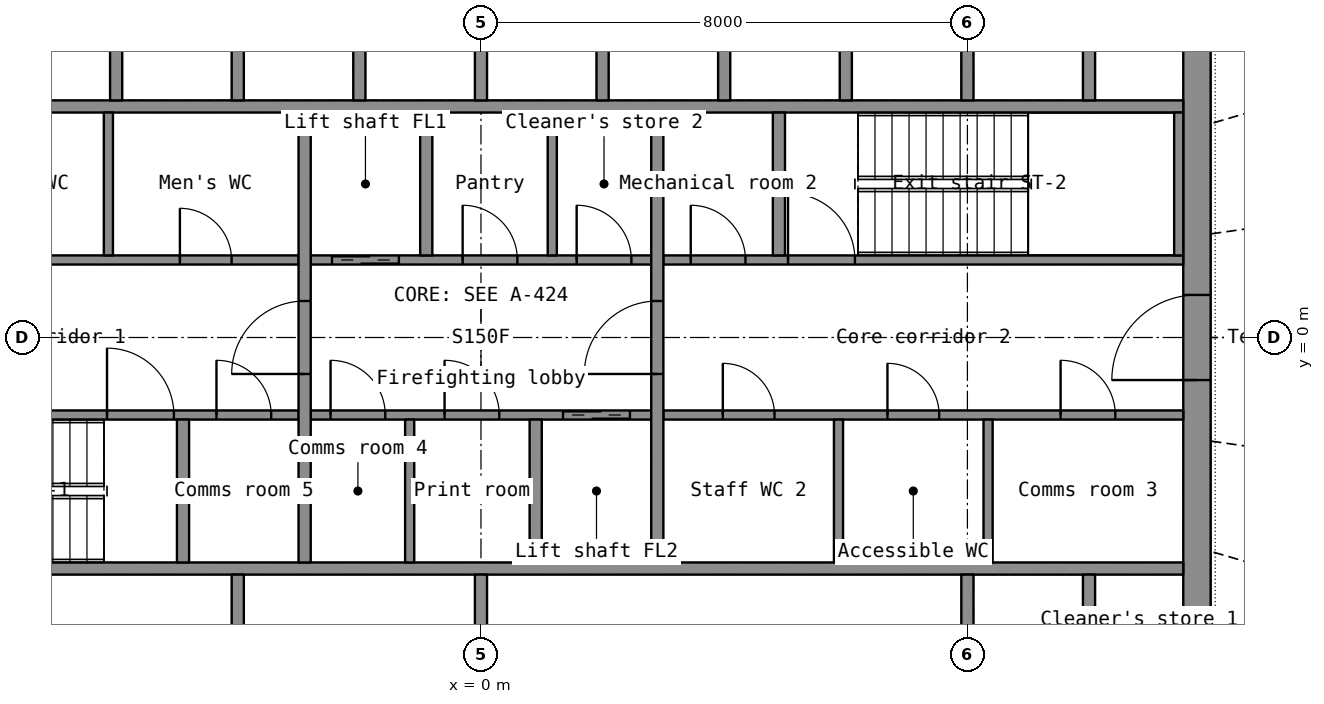
"""IFC4 building model, lengths in metres.
Left out: names, types, materials, properties, quantities, classifications, styles, units other than length and angle.
Written with IfcOpenShell. Run it as: python <this file> out.ifc"""

import sys

from ifc_helpers import new_model, si_unit, direction, frame, frame_2d, origin, place, context, subcontext, project, spatial, rectangle, extrude, element, fill, save


model = new_model("IFC4")
c1 = context("Model", 3, precision=1e-05, world=origin(), true_north=direction((0.0, 1.0)))
c2 = subcontext(c1, "Body", "Model", "MODEL_VIEW")
j1 = project(units=[si_unit("LENGTHUNIT", "METRE"), si_unit("PLANEANGLEUNIT", "RADIAN")], contexts=[c1])
p1 = place(None, origin())
s1 = spatial("IfcSite", under=j1, at=p1, CompositionType="ELEMENT")
p2 = place(p1, origin())
s2 = spatial("IfcBuilding", under=s1, at=p2, CompositionType="ELEMENT")
p3 = place(p2, frame((0.0, 0.0, 179.3)))
s3 = spatial("IfcBuildingStorey", under=s2, at=p3, CompositionType="ELEMENT", Elevation=179.3)
p4 = place(p3, frame((11.775, -7.2, 0.0), z_axis=(0.0, 0.0, 1.0), x_axis=(0.0, 1.0, 0.0)))
e1 = element("IfcWall", 1, at=p4, inside=s3, PredefinedType="SHEAR", context=c2, shape_type="SweptSolid", body=[
    extrude(rectangle(XDim=14.4, YDim=0.45, at=frame_2d((7.2, 0.0))), origin(), (0.0, 0.0, 1.0), 3.3),
])
p5 = place(p4, frame((6.5, 0.0, 0.0)))
e2 = element("IfcOpeningElement", 2, at=p5, cuts=e1, PredefinedType="OPENING", context=c2, shape_type="SweptSolid", body=[
    extrude(rectangle(XDim=1.4, YDim=2.2, at=frame_2d((0.7, 1.1))), frame((0.0, 0.235, 0.0), z_axis=(0.0, -1.0, 0.0), x_axis=(1.0, 0.0, 0.0)), (0.0, 0.0, 1.0), 0.47),
])
for number, where, z_axis, x_axis in (
    (3, (-11.55, -3.8, 0.0), (0.0, 0.0, 1.0), (1.0, 0.0, 0.0)),
    (4, (-11.55, 3.8, 0.0), (0.0, 0.0, 1.0), (1.0, 0.0, 0.0)),
):
    element("IfcWall", number, at=place(p3, frame(where, z_axis=z_axis, x_axis=x_axis)), inside=s3, PredefinedType="SHEAR", context=c2, shape_type="SweptSolid", body=[
        extrude(rectangle(XDim=23.1, YDim=0.2, at=frame_2d((11.55, 0.0))), origin(), (0.0, 0.0, 1.0), 3.3),
    ])
for number, where, z_axis, x_axis in (
    (5, (8.0, -6.75, 0.0), (0.0, 0.0, 1.0), (0.0, 1.0, 0.0)),
    (6, (10.0, -6.75, 0.0), (0.0, 0.0, 1.0), (0.0, 1.0, 0.0)),
):
    element("IfcWall", number, at=place(p3, frame(where, z_axis=z_axis, x_axis=x_axis)), inside=s3, PredefinedType="SHEAR", context=c2, shape_type="SweptSolid", body=[
        extrude(rectangle(XDim=2.85, YDim=0.2, at=frame_2d((1.425, 0.0))), origin(), (0.0, 0.0, 1.0), 3.3),
    ])
for number, where, z_axis, x_axis in (
    (7, (-4.0, -6.75, 0.0), (0.0, 0.0, 1.0), (0.0, 1.0, 0.0)),
    (8, (0.0, -6.75, 0.0), (0.0, 0.0, 1.0), (0.0, 1.0, 0.0)),
):
    element("IfcWall", number, at=place(p3, frame(where, z_axis=z_axis, x_axis=x_axis)), inside=s3, PredefinedType="PARTITIONING", context=c2, shape_type="SweptSolid", body=[
        extrude(rectangle(XDim=2.85, YDim=0.2, at=frame_2d((1.425, 0.0))), origin(), (0.0, 0.0, 1.0), 3.3),
    ])
for number, where, z_axis, x_axis in (
    (9, (-6.0, 3.9, 0.0), (0.0, 0.0, 1.0), (0.0, 1.0, 0.0)),
    (10, (-4.0, 3.9, 0.0), (0.0, 0.0, 1.0), (0.0, 1.0, 0.0)),
    (11, (-2.0, 3.9, 0.0), (0.0, 0.0, 1.0), (0.0, 1.0, 0.0)),
    (12, (0.0, 3.9, 0.0), (0.0, 0.0, 1.0), (0.0, 1.0, 0.0)),
    (13, (2.0, 3.9, 0.0), (0.0, 0.0, 1.0), (0.0, 1.0, 0.0)),
    (14, (4.0, 3.9, 0.0), (0.0, 0.0, 1.0), (0.0, 1.0, 0.0)),
    (15, (6.0, 3.9, 0.0), (0.0, 0.0, 1.0), (0.0, 1.0, 0.0)),
    (16, (8.0, 3.9, 0.0), (0.0, 0.0, 1.0), (0.0, 1.0, 0.0)),
    (17, (10.0, 3.9, 0.0), (0.0, 0.0, 1.0), (0.0, 1.0, 0.0)),
):
    element("IfcWall", number, at=place(p3, frame(where, z_axis=z_axis, x_axis=x_axis)), inside=s3, PredefinedType="SHEAR", context=c2, shape_type="SweptSolid", body=[
        extrude(rectangle(XDim=2.85, YDim=0.2, at=frame_2d((1.425, 0.0))), origin(), (0.0, 0.0, 1.0), 3.3),
    ])
p6 = place(p3, frame((-11.55, -1.275, 0.0), z_axis=(0.0, 0.0, 1.0), x_axis=(1.0, 0.0, 0.0)))
e18 = element("IfcWall", 18, at=p6, inside=s3, PredefinedType="SHEAR", context=c2, shape_type="SweptSolid", body=[
    extrude(rectangle(XDim=8.55, YDim=0.15, at=frame_2d((4.275, 0.0))), origin(), (0.0, 0.0, 1.0), 3.3),
])
p7 = place(p6, frame((5.4, 0.0, 0.0)))
e19 = element("IfcOpeningElement", 19, at=p7, cuts=e18, PredefinedType="OPENING", context=c2, shape_type="SweptSolid", body=[
    extrude(rectangle(XDim=1.1, YDim=2.15, at=frame_2d((0.55, 1.075))), frame((0.0, 0.085, 0.0), z_axis=(0.0, -1.0, 0.0), x_axis=(1.0, 0.0, 0.0)), (0.0, 0.0, 1.0), 0.17),
])
p8 = place(p6, frame((7.2, 0.0, 0.0)))
e20 = element("IfcOpeningElement", 20, at=p8, cuts=e18, PredefinedType="OPENING", context=c2, shape_type="SweptSolid", body=[
    extrude(rectangle(XDim=0.9, YDim=2.1, at=frame_2d((0.45, 1.05))), frame((0.0, 0.085, 0.0), z_axis=(0.0, -1.0, 0.0), x_axis=(1.0, 0.0, 0.0)), (0.0, 0.0, 1.0), 0.17),
])
p9 = place(p3, frame((-2.8, -1.275, 0.0), z_axis=(0.0, 0.0, 1.0), x_axis=(1.0, 0.0, 0.0)))
e21 = element("IfcWall", 21, at=p9, inside=s3, PredefinedType="SHEAR", context=c2, shape_type="SweptSolid", body=[
    extrude(rectangle(XDim=5.6, YDim=0.15, at=frame_2d((2.8, 0.0))), origin(), (0.0, 0.0, 1.0), 3.3),
])
p10 = place(p9, frame((4.15, 0.0, 0.0)))
e22 = element("IfcOpeningElement", 22, at=p10, cuts=e21, PredefinedType="OPENING", context=c2, shape_type="SweptSolid", body=[
    extrude(rectangle(XDim=1.1, YDim=2.2, at=frame_2d((0.55, 1.1))), frame((0.0, 0.085, 0.0), z_axis=(0.0, -1.0, 0.0), x_axis=(1.0, 0.0, 0.0)), (0.0, 0.0, 1.0), 0.17),
])
p11 = place(p9, frame((0.326, 0.0, 0.0)))
e23 = element("IfcOpeningElement", 23, at=p11, cuts=e21, PredefinedType="OPENING", context=c2, shape_type="SweptSolid", body=[
    extrude(rectangle(XDim=0.9, YDim=2.1, at=frame_2d((0.45, 1.05))), frame((0.0, 0.085, 0.0), z_axis=(0.0, -1.0, 0.0), x_axis=(1.0, 0.0, 0.0)), (0.0, 0.0, 1.0), 0.17),
])
p12 = place(p9, frame((2.201, 0.0, 0.0)))
e24 = element("IfcOpeningElement", 24, at=p12, cuts=e21, PredefinedType="OPENING", context=c2, shape_type="SweptSolid", body=[
    extrude(rectangle(XDim=0.9, YDim=2.1, at=frame_2d((0.45, 1.05))), frame((0.0, 0.085, 0.0), z_axis=(0.0, -1.0, 0.0), x_axis=(1.0, 0.0, 0.0)), (0.0, 0.0, 1.0), 0.17),
])
p13 = place(p3, frame((3.0, -1.275, 0.0), z_axis=(0.0, 0.0, 1.0), x_axis=(1.0, 0.0, 0.0)))
e25 = element("IfcWall", 25, at=p13, inside=s3, PredefinedType="PARTITIONING", context=c2, shape_type="SweptSolid", body=[
    extrude(rectangle(XDim=8.55, YDim=0.15, at=frame_2d((4.275, 0.0))), origin(), (0.0, 0.0, 1.0), 3.3),
])
p14 = place(p13, frame((0.978, 0.0, 0.0)))
e26 = element("IfcOpeningElement", 26, at=p14, cuts=e25, PredefinedType="OPENING", context=c2, shape_type="SweptSolid", body=[
    extrude(rectangle(XDim=0.85, YDim=2.1, at=frame_2d((0.425, 1.05))), frame((0.0, 0.085, 0.0), z_axis=(0.0, -1.0, 0.0), x_axis=(1.0, 0.0, 0.0)), (0.0, 0.0, 1.0), 0.17),
])
p15 = place(p13, frame((3.685, 0.0, 0.0)))
e27 = element("IfcOpeningElement", 27, at=p15, cuts=e25, PredefinedType="OPENING", context=c2, shape_type="SweptSolid", body=[
    extrude(rectangle(XDim=0.85, YDim=2.1, at=frame_2d((0.425, 1.05))), frame((0.0, 0.085, 0.0), z_axis=(0.0, -1.0, 0.0), x_axis=(1.0, 0.0, 0.0)), (0.0, 0.0, 1.0), 0.17),
])
p16 = place(p13, frame((6.532, 0.0, 0.0)))
e28 = element("IfcOpeningElement", 28, at=p16, cuts=e25, PredefinedType="OPENING", context=c2, shape_type="SweptSolid", body=[
    extrude(rectangle(XDim=0.9, YDim=2.1, at=frame_2d((0.45, 1.05))), frame((0.0, 0.085, 0.0), z_axis=(0.0, -1.0, 0.0), x_axis=(1.0, 0.0, 0.0)), (0.0, 0.0, 1.0), 0.17),
])
p17 = place(p3, frame((-11.55, 1.275, 0.0), z_axis=(0.0, 0.0, 1.0), x_axis=(1.0, 0.0, 0.0)))
e29 = element("IfcWall", 29, at=p17, inside=s3, PredefinedType="PARTITIONING", context=c2, shape_type="SweptSolid", body=[
    extrude(rectangle(XDim=8.55, YDim=0.15, at=frame_2d((4.275, 0.0))), origin(), (0.0, 0.0, 1.0), 3.3),
])
p18 = place(p17, frame((0.623, 0.0, 0.0)))
e30 = element("IfcOpeningElement", 30, at=p18, cuts=e29, PredefinedType="OPENING", context=c2, shape_type="SweptSolid", body=[
    extrude(rectangle(XDim=0.9, YDim=2.1, at=frame_2d((0.45, 1.05))), frame((0.0, 0.085, 0.0), z_axis=(0.0, -1.0, 0.0), x_axis=(1.0, 0.0, 0.0)), (0.0, 0.0, 1.0), 0.17),
])
p19 = place(p17, frame((3.396, 0.0, 0.0)))
e31 = element("IfcOpeningElement", 31, at=p19, cuts=e29, PredefinedType="OPENING", context=c2, shape_type="SweptSolid", body=[
    extrude(rectangle(XDim=0.85, YDim=2.1, at=frame_2d((0.425, 1.05))), frame((0.0, 0.085, 0.0), z_axis=(0.0, -1.0, 0.0), x_axis=(1.0, 0.0, 0.0)), (0.0, 0.0, 1.0), 0.17),
])
p20 = place(p17, frame((6.599, 0.0, 0.0)))
e32 = element("IfcOpeningElement", 32, at=p20, cuts=e29, PredefinedType="OPENING", context=c2, shape_type="SweptSolid", body=[
    extrude(rectangle(XDim=0.85, YDim=2.1, at=frame_2d((0.425, 1.05))), frame((0.0, 0.085, 0.0), z_axis=(0.0, -1.0, 0.0), x_axis=(1.0, 0.0, 0.0)), (0.0, 0.0, 1.0), 0.17),
])
p21 = place(p3, frame((-2.8, 1.275, 0.0), z_axis=(0.0, 0.0, 1.0), x_axis=(1.0, 0.0, 0.0)))
e33 = element("IfcWall", 33, at=p21, inside=s3, PredefinedType="SHEAR", context=c2, shape_type="SweptSolid", body=[
    extrude(rectangle(XDim=5.6, YDim=0.15, at=frame_2d((2.8, 0.0))), origin(), (0.0, 0.0, 1.0), 3.3),
])
p22 = place(p21, frame((0.35, 0.0, 0.0)))
e34 = element("IfcOpeningElement", 34, at=p22, cuts=e33, PredefinedType="OPENING", context=c2, shape_type="SweptSolid", body=[
    extrude(rectangle(XDim=1.1, YDim=2.2, at=frame_2d((0.55, 1.1))), frame((0.0, 0.085, 0.0), z_axis=(0.0, -1.0, 0.0), x_axis=(1.0, 0.0, 0.0)), (0.0, 0.0, 1.0), 0.17),
])
p23 = place(p21, frame((2.499, 0.0, 0.0)))
e35 = element("IfcOpeningElement", 35, at=p23, cuts=e33, PredefinedType="OPENING", context=c2, shape_type="SweptSolid", body=[
    extrude(rectangle(XDim=0.9, YDim=2.1, at=frame_2d((0.45, 1.05))), frame((0.0, 0.085, 0.0), z_axis=(0.0, -1.0, 0.0), x_axis=(1.0, 0.0, 0.0)), (0.0, 0.0, 1.0), 0.17),
])
p24 = place(p21, frame((4.374, 0.0, 0.0)))
e36 = element("IfcOpeningElement", 36, at=p24, cuts=e33, PredefinedType="OPENING", context=c2, shape_type="SweptSolid", body=[
    extrude(rectangle(XDim=0.9, YDim=2.1, at=frame_2d((0.45, 1.05))), frame((0.0, 0.085, 0.0), z_axis=(0.0, -1.0, 0.0), x_axis=(1.0, 0.0, 0.0)), (0.0, 0.0, 1.0), 0.17),
])
p25 = place(p3, frame((3.0, 1.275, 0.0), z_axis=(0.0, 0.0, 1.0), x_axis=(1.0, 0.0, 0.0)))
e37 = element("IfcWall", 37, at=p25, inside=s3, PredefinedType="SHEAR", context=c2, shape_type="SweptSolid", body=[
    extrude(rectangle(XDim=8.55, YDim=0.15, at=frame_2d((4.275, 0.0))), origin(), (0.0, 0.0, 1.0), 3.3),
])
p26 = place(p25, frame((2.05, 0.0, 0.0)))
e38 = element("IfcOpeningElement", 38, at=p26, cuts=e37, PredefinedType="OPENING", context=c2, shape_type="SweptSolid", body=[
    extrude(rectangle(XDim=1.1, YDim=2.15, at=frame_2d((0.55, 1.075))), frame((0.0, 0.085, 0.0), z_axis=(0.0, -1.0, 0.0), x_axis=(1.0, 0.0, 0.0)), (0.0, 0.0, 1.0), 0.17),
])
p27 = place(p25, frame((0.45, 0.0, 0.0)))
e39 = element("IfcOpeningElement", 39, at=p27, cuts=e37, PredefinedType="OPENING", context=c2, shape_type="SweptSolid", body=[
    extrude(rectangle(XDim=0.9, YDim=2.1, at=frame_2d((0.45, 1.05))), frame((0.0, 0.085, 0.0), z_axis=(0.0, -1.0, 0.0), x_axis=(1.0, 0.0, 0.0)), (0.0, 0.0, 1.0), 0.17),
])
p28 = place(p3, frame((-2.9, -3.7, 0.0), z_axis=(0.0, 0.0, 1.0), x_axis=(0.0, 1.0, 0.0)))
e40 = element("IfcWall", 40, at=p28, inside=s3, PredefinedType="SHEAR", context=c2, shape_type="SweptSolid", body=[
    extrude(rectangle(XDim=7.4, YDim=0.2, at=frame_2d((3.7, 0.0))), origin(), (0.0, 0.0, 1.0), 3.3),
])
p29 = place(p28, frame((3.1, 0.0, 0.0)))
e41 = element("IfcOpeningElement", 41, at=p29, cuts=e40, PredefinedType="OPENING", context=c2, shape_type="SweptSolid", body=[
    extrude(rectangle(XDim=1.2, YDim=2.2, at=frame_2d((0.6, 1.1))), frame((0.0, 0.11, 0.0), z_axis=(0.0, -1.0, 0.0), x_axis=(1.0, 0.0, 0.0)), (0.0, 0.0, 1.0), 0.22),
])
p30 = place(p3, frame((2.9, -3.7, 0.0), z_axis=(0.0, 0.0, 1.0), x_axis=(0.0, 1.0, 0.0)))
e42 = element("IfcWall", 42, at=p30, inside=s3, PredefinedType="SHEAR", context=c2, shape_type="SweptSolid", body=[
    extrude(rectangle(XDim=7.4, YDim=0.2, at=frame_2d((3.7, 0.0))), origin(), (0.0, 0.0, 1.0), 3.3),
])
p31 = place(p30, frame((3.1, 0.0, 0.0)))
e43 = element("IfcOpeningElement", 43, at=p31, cuts=e42, PredefinedType="OPENING", context=c2, shape_type="SweptSolid", body=[
    extrude(rectangle(XDim=1.2, YDim=2.2, at=frame_2d((0.6, 1.1))), frame((0.0, 0.11, 0.0), z_axis=(0.0, -1.0, 0.0), x_axis=(1.0, 0.0, 0.0)), (0.0, 0.0, 1.0), 0.22),
])
for number, where, z_axis, x_axis in (
    (44, (-0.9, 1.35, 0.0), (0.0, 0.0, 1.0), (0.0, 1.0, 0.0)),
    (45, (0.9, -3.7, 0.0), (0.0, 0.0, 1.0), (0.0, 1.0, 0.0)),
):
    element("IfcWall", number, at=place(p3, frame(where, z_axis=z_axis, x_axis=x_axis)), inside=s3, PredefinedType="SHEAR", context=c2, shape_type="SweptSolid", body=[
        extrude(rectangle(XDim=2.35, YDim=0.2, at=frame_2d((1.175, 0.0))), origin(), (0.0, 0.0, 1.0), 3.3),
    ])
p32 = place(p3, frame((11.475, 1.35, 0.0), z_axis=(0.0, 0.0, 1.0), x_axis=(0.0, 1.0, 0.0)))
e46 = element("IfcWall", 46, at=p32, inside=s3, PredefinedType="SHEAR", context=c2, shape_type="SweptSolid", body=[
    extrude(rectangle(XDim=2.35, YDim=0.15, at=frame_2d((1.175, 0.0))), origin(), (0.0, 0.0, 1.0), 3.3),
])
for number, where, z_axis, x_axis in (
    (47, (-4.9, -3.7, 0.0), (0.0, 0.0, 1.0), (0.0, 1.0, 0.0)),
    (48, (4.9, 1.35, 0.0), (0.0, 0.0, 1.0), (0.0, 1.0, 0.0)),
):
    element("IfcWall", number, at=place(p3, frame(where, z_axis=z_axis, x_axis=x_axis)), inside=s3, PredefinedType="SHEAR", context=c2, shape_type="SweptSolid", body=[
        extrude(rectangle(XDim=2.35, YDim=0.2, at=frame_2d((1.175, 0.0))), origin(), (0.0, 0.0, 1.0), 3.3),
    ])
for number, where, z_axis, x_axis in (
    (49, (-6.127, 1.35, 0.0), (0.0, 0.0, 1.0), (0.0, 1.0, 0.0)),
    (50, (5.88, -3.7, 0.0), (0.0, 0.0, 1.0), (0.0, 1.0, 0.0)),
    (51, (8.34, -3.7, 0.0), (0.0, 0.0, 1.0), (0.0, 1.0, 0.0)),
    (52, (1.173, 1.35, 0.0), (0.0, 0.0, 1.0), (0.0, 1.0, 0.0)),
    (53, (-1.173, -3.7, 0.0), (0.0, 0.0, 1.0), (0.0, 1.0, 0.0)),
):
    element("IfcWall", number, at=place(p3, frame(where, z_axis=z_axis, x_axis=x_axis)), inside=s3, PredefinedType="PARTITIONING", context=c2, shape_type="SweptSolid", body=[
        extrude(rectangle(XDim=2.35, YDim=0.15, at=frame_2d((1.175, 0.0))), origin(), (0.0, 0.0, 1.0), 3.3),
    ])
p33 = place(p5, origin())
e54 = element("IfcDoor", 54, at=p33, inside=s3, OperationType="DOUBLE_DOOR_SINGLE_SWING", PredefinedType="DOOR", context=c2, shape_type="SweptSolid", body=[
    extrude(rectangle(XDim=1.4, YDim=2.2, at=frame_2d((0.7, 1.1))), frame((0.0, 0.025, 0.0), z_axis=(0.0, -1.0, 0.0), x_axis=(1.0, 0.0, 0.0)), (0.0, 0.0, 1.0), 0.05),
])
fill(e2, e54)
p34 = place(p29, origin())
e55 = element("IfcDoor", 55, at=p34, inside=s3, OperationType="SINGLE_SWING_LEFT", PredefinedType="DOOR", context=c2, shape_type="SweptSolid", body=[
    extrude(rectangle(XDim=1.2, YDim=2.2, at=frame_2d((0.6, 1.1))), frame((0.0, 0.025, 0.0), z_axis=(0.0, -1.0, 0.0), x_axis=(1.0, 0.0, 0.0)), (0.0, 0.0, 1.0), 0.05),
])
fill(e41, e55)
p35 = place(p31, origin())
e56 = element("IfcDoor", 56, at=p35, inside=s3, OperationType="SINGLE_SWING_LEFT", PredefinedType="DOOR", context=c2, shape_type="SweptSolid", body=[
    extrude(rectangle(XDim=1.2, YDim=2.2, at=frame_2d((0.6, 1.1))), frame((0.0, 0.025, 0.0), z_axis=(0.0, -1.0, 0.0), x_axis=(1.0, 0.0, 0.0)), (0.0, 0.0, 1.0), 0.05),
])
fill(e43, e56)
p36 = place(p22, origin())
e57 = element("IfcDoor", 57, at=p36, inside=s3, OperationType="DOUBLE_DOOR_SLIDING", PredefinedType="DOOR", context=c2, shape_type="SweptSolid", body=[
    extrude(rectangle(XDim=1.1, YDim=2.2, at=frame_2d((0.55, 1.1))), frame((0.0, 0.025, 0.0), z_axis=(0.0, -1.0, 0.0), x_axis=(1.0, 0.0, 0.0)), (0.0, 0.0, 1.0), 0.05),
])
fill(e34, e57)
p37 = place(p10, origin())
e58 = element("IfcDoor", 58, at=p37, inside=s3, OperationType="DOUBLE_DOOR_SLIDING", PredefinedType="DOOR", context=c2, shape_type="SweptSolid", body=[
    extrude(rectangle(XDim=1.1, YDim=2.2, at=frame_2d((0.55, 1.1))), frame((0.0, 0.025, 0.0), z_axis=(0.0, -1.0, 0.0), x_axis=(1.0, 0.0, 0.0)), (0.0, 0.0, 1.0), 0.05),
])
fill(e22, e58)
p38 = place(p7, origin())
e59 = element("IfcDoor", 59, at=p38, inside=s3, OperationType="SINGLE_SWING_LEFT", PredefinedType="DOOR", context=c2, shape_type="SweptSolid", body=[
    extrude(rectangle(XDim=1.1, YDim=2.15, at=frame_2d((0.55, 1.075))), frame((0.0, 0.025, 0.0), z_axis=(0.0, -1.0, 0.0), x_axis=(1.0, 0.0, 0.0)), (0.0, 0.0, 1.0), 0.05),
])
fill(e19, e59)
p39 = place(p26, origin())
e60 = element("IfcDoor", 60, at=p39, inside=s3, OperationType="SINGLE_SWING_LEFT", PredefinedType="DOOR", context=c2, shape_type="SweptSolid", body=[
    extrude(rectangle(XDim=1.1, YDim=2.15, at=frame_2d((0.55, 1.075))), frame((0.0, 0.025, 0.0), z_axis=(0.0, -1.0, 0.0), x_axis=(1.0, 0.0, 0.0)), (0.0, 0.0, 1.0), 0.05),
])
fill(e38, e60)
p40 = place(p20, origin())
e61 = element("IfcDoor", 61, at=p40, inside=s3, OperationType="SINGLE_SWING_LEFT", PredefinedType="DOOR", context=c2, shape_type="SweptSolid", body=[
    extrude(rectangle(XDim=0.85, YDim=2.1, at=frame_2d((0.425, 1.05))), frame((0.0, 0.025, 0.0), z_axis=(0.0, -1.0, 0.0), x_axis=(1.0, 0.0, 0.0)), (0.0, 0.0, 1.0), 0.05),
])
fill(e32, e61)
p41 = place(p14, origin())
e62 = element("IfcDoor", 62, at=p41, inside=s3, OperationType="SINGLE_SWING_LEFT", PredefinedType="DOOR", context=c2, shape_type="SweptSolid", body=[
    extrude(rectangle(XDim=0.85, YDim=2.1, at=frame_2d((0.425, 1.05))), frame((0.0, 0.025, 0.0), z_axis=(0.0, -1.0, 0.0), x_axis=(1.0, 0.0, 0.0)), (0.0, 0.0, 1.0), 0.05),
])
fill(e26, e62)
p42 = place(p15, origin())
e63 = element("IfcDoor", 63, at=p42, inside=s3, OperationType="SINGLE_SWING_LEFT", PredefinedType="DOOR", context=c2, shape_type="SweptSolid", body=[
    extrude(rectangle(XDim=0.85, YDim=2.1, at=frame_2d((0.425, 1.05))), frame((0.0, 0.025, 0.0), z_axis=(0.0, -1.0, 0.0), x_axis=(1.0, 0.0, 0.0)), (0.0, 0.0, 1.0), 0.05),
])
fill(e27, e63)
p43 = place(p16, origin())
e64 = element("IfcDoor", 64, at=p43, inside=s3, OperationType="SINGLE_SWING_LEFT", PredefinedType="DOOR", context=c2, shape_type="SweptSolid", body=[
    extrude(rectangle(XDim=0.9, YDim=2.1, at=frame_2d((0.45, 1.05))), frame((0.0, 0.025, 0.0), z_axis=(0.0, -1.0, 0.0), x_axis=(1.0, 0.0, 0.0)), (0.0, 0.0, 1.0), 0.05),
])
fill(e28, e64)
p44 = place(p23, origin())
e65 = element("IfcDoor", 65, at=p44, inside=s3, OperationType="SINGLE_SWING_LEFT", PredefinedType="DOOR", context=c2, shape_type="SweptSolid", body=[
    extrude(rectangle(XDim=0.9, YDim=2.1, at=frame_2d((0.45, 1.05))), frame((0.0, 0.025, 0.0), z_axis=(0.0, -1.0, 0.0), x_axis=(1.0, 0.0, 0.0)), (0.0, 0.0, 1.0), 0.05),
])
fill(e35, e65)
p45 = place(p24, origin())
e66 = element("IfcDoor", 66, at=p45, inside=s3, OperationType="SINGLE_SWING_LEFT", PredefinedType="DOOR", context=c2, shape_type="SweptSolid", body=[
    extrude(rectangle(XDim=0.9, YDim=2.1, at=frame_2d((0.45, 1.05))), frame((0.0, 0.025, 0.0), z_axis=(0.0, -1.0, 0.0), x_axis=(1.0, 0.0, 0.0)), (0.0, 0.0, 1.0), 0.05),
])
fill(e36, e66)
p46 = place(p11, origin())
e67 = element("IfcDoor", 67, at=p46, inside=s3, OperationType="SINGLE_SWING_LEFT", PredefinedType="DOOR", context=c2, shape_type="SweptSolid", body=[
    extrude(rectangle(XDim=0.9, YDim=2.1, at=frame_2d((0.45, 1.05))), frame((0.0, 0.025, 0.0), z_axis=(0.0, -1.0, 0.0), x_axis=(1.0, 0.0, 0.0)), (0.0, 0.0, 1.0), 0.05),
])
fill(e23, e67)
p47 = place(p12, origin())
e68 = element("IfcDoor", 68, at=p47, inside=s3, OperationType="SINGLE_SWING_LEFT", PredefinedType="DOOR", context=c2, shape_type="SweptSolid", body=[
    extrude(rectangle(XDim=0.9, YDim=2.1, at=frame_2d((0.45, 1.05))), frame((0.0, 0.025, 0.0), z_axis=(0.0, -1.0, 0.0), x_axis=(1.0, 0.0, 0.0)), (0.0, 0.0, 1.0), 0.05),
])
fill(e24, e68)
p48 = place(p27, origin())
e69 = element("IfcDoor", 69, at=p48, inside=s3, OperationType="SINGLE_SWING_LEFT", PredefinedType="DOOR", context=c2, shape_type="SweptSolid", body=[
    extrude(rectangle(XDim=0.9, YDim=2.1, at=frame_2d((0.45, 1.05))), frame((0.0, 0.025, 0.0), z_axis=(0.0, -1.0, 0.0), x_axis=(1.0, 0.0, 0.0)), (0.0, 0.0, 1.0), 0.05),
])
fill(e39, e69)
p49 = place(p8, origin())
e70 = element("IfcDoor", 70, at=p49, inside=s3, OperationType="SINGLE_SWING_LEFT", PredefinedType="DOOR", context=c2, shape_type="SweptSolid", body=[
    extrude(rectangle(XDim=0.9, YDim=2.1, at=frame_2d((0.45, 1.05))), frame((0.0, 0.025, 0.0), z_axis=(0.0, -1.0, 0.0), x_axis=(1.0, 0.0, 0.0)), (0.0, 0.0, 1.0), 0.05),
])
fill(e20, e70)
save(model, sys.argv[1])
